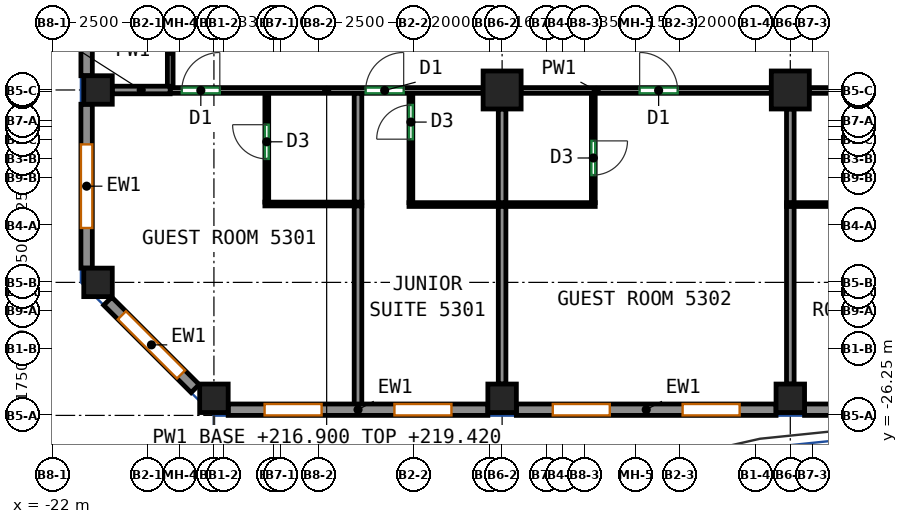
"""IFC4 building model, lengths in metres.
Left out: names, types, materials, properties, quantities, classifications, styles, units other than length and angle.
Written with IfcOpenShell. Run it as: python <this file> out.ifc"""

import sys

from ifc_helpers import new_model, si_unit, direction, frame, frame_2d, origin, origin_2d, place, context, subcontext, project, spatial, rectangle, extrude, source, transform, mapped, element, fill, save


model = new_model("IFC4")
c1 = context("Model", 3, precision=1e-05, world=origin(), true_north=direction((0.0, 1.0)))
c2 = subcontext(c1, "Body", "Model", "MODEL_VIEW")
j1 = project(units=[si_unit("LENGTHUNIT", "METRE"), si_unit("PLANEANGLEUNIT", "RADIAN")], contexts=[c1])
p1 = place(None, origin())
s1 = spatial("IfcSite", under=j1, at=p1, CompositionType="ELEMENT")
p2 = place(p1, origin())
s2 = spatial("IfcBuilding", under=s1, at=p2, CompositionType="ELEMENT")
p3 = place(p2, frame((0.0, 0.0, 216.9)))
s3 = spatial("IfcBuildingStorey", under=s2, at=p3, CompositionType="ELEMENT", Elevation=216.9)
m1 = source(origin(), c2, "Body", "SweptSolid", [
    extrude(rectangle(XDim=0.75, YDim=0.75, at=origin_2d()), origin(), (0.0, 0.0, 1.0), 3.12),
])
for number, where, z_axis, x_axis in (
    (1, (-20.8, -22.75, 0.0), (0.0, 0.0, 1.0), (1.0, 0.0, 0.0)),
    (2, (-20.8, -17.688, 0.0), (0.0, 0.0, 1.0), (1.0, 0.0, 0.0)),
    (3, (-17.75, -25.8, 0.0), (0.0, 0.0, 1.0), (1.0, 0.0, 0.0)),
    (4, (-10.167, -25.8, 0.0), (0.0, 0.0, 1.0), (1.0, 0.0, 0.0)),
):
    element("IfcColumn", number, at=place(p3, frame(where, z_axis=z_axis, x_axis=x_axis)), inside=s3, PredefinedType="COLUMN", context=c2, shape_type="MappedRepresentation", body=[
        mapped(m1, transform((0.0, 0.0, 0.0))),
    ])
m2 = source(origin(), c2, "Body", "SweptSolid", [
    extrude(rectangle(XDim=1.0, YDim=1.0, at=origin_2d()), origin(), (0.0, 0.0, 1.0), 3.12),
])
p4 = place(p3, frame((-10.167, -17.688, 0.0), z_axis=(0.0, 0.0, 1.0), x_axis=(1.0, 0.0, 0.0)))
e5 = element("IfcColumn", 5, at=p4, inside=s3, PredefinedType="COLUMN", context=c2, shape_type="MappedRepresentation", body=[
    mapped(m2, transform((0.0, 0.0, 0.0))),
])
p5 = place(p3, frame((-2.583, -25.8, 0.0), z_axis=(0.0, 0.0, 1.0), x_axis=(1.0, 0.0, 0.0)))
e6 = element("IfcColumn", 6, at=p5, inside=s3, PredefinedType="COLUMN", context=c2, shape_type="MappedRepresentation", body=[
    mapped(m1, transform((0.0, 0.0, 0.0))),
])
p6 = place(p3, frame((-2.583, -17.688, 0.0), z_axis=(0.0, 0.0, 1.0), x_axis=(1.0, 0.0, 0.0)))
e7 = element("IfcColumn", 7, at=p6, inside=s3, PredefinedType="COLUMN", context=c2, shape_type="MappedRepresentation", body=[
    mapped(m2, transform((0.0, 0.0, 0.0))),
])
m3 = source(origin(), c2, "Body", "SweptSolid", [
    extrude(rectangle(XDim=6.833, YDim=0.3, at=frame_2d((3.417, 0.0))), origin(), (0.0, 0.0, 1.0), 3.12),
])
p7 = place(p3, frame((-17.375, -26.1, 0.0), z_axis=(0.0, 0.0, 1.0), x_axis=(1.0, 0.0, 0.0)))
e8 = element("IfcWall", 8, at=p7, inside=s3, PredefinedType="SOLIDWALL", context=c2, shape_type="MappedRepresentation", body=[
    mapped(m3, transform((0.0, 0.0, 0.0))),
])
p8 = place(p7, frame((0.958, 0.0, 0.85)))
e9 = element("IfcOpeningElement", 9, at=p8, cuts=e8, PredefinedType="OPENING", context=c2, shape_type="SweptSolid", body=[
    extrude(rectangle(XDim=1.5, YDim=1.95, at=frame_2d((0.75, 0.975))), frame((0.0, 0.16, 0.0), z_axis=(0.0, -1.0, 0.0), x_axis=(1.0, 0.0, 0.0)), (0.0, 0.0, 1.0), 0.32),
])
p9 = place(p7, frame((4.375, 0.0, 0.85)))
e10 = element("IfcOpeningElement", 10, at=p9, cuts=e8, PredefinedType="OPENING", context=c2, shape_type="SweptSolid", body=[
    extrude(rectangle(XDim=1.5, YDim=1.95, at=frame_2d((0.75, 0.975))), frame((0.0, 0.16, 0.0), z_axis=(0.0, -1.0, 0.0), x_axis=(1.0, 0.0, 0.0)), (0.0, 0.0, 1.0), 0.32),
])
m4 = source(origin(), c2, "Body", "SweptSolid", [
    extrude(rectangle(XDim=6.833, YDim=0.3, at=frame_2d((3.417, 0.0))), origin(), (0.0, 0.0, 1.0), 3.12),
])
p10 = place(p3, frame((-9.792, -26.1, 0.0), z_axis=(0.0, 0.0, 1.0), x_axis=(1.0, 0.0, 0.0)))
e11 = element("IfcWall", 11, at=p10, inside=s3, PredefinedType="SOLIDWALL", context=c2, shape_type="MappedRepresentation", body=[
    mapped(m4, transform((0.0, 0.0, 0.0))),
])
p11 = place(p10, frame((0.958, 0.0, 0.85)))
e12 = element("IfcOpeningElement", 12, at=p11, cuts=e11, PredefinedType="OPENING", context=c2, shape_type="SweptSolid", body=[
    extrude(rectangle(XDim=1.5, YDim=1.95, at=frame_2d((0.75, 0.975))), frame((0.0, 0.16, 0.0), z_axis=(0.0, -1.0, 0.0), x_axis=(1.0, 0.0, 0.0)), (0.0, 0.0, 1.0), 0.32),
])
p12 = place(p10, frame((4.375, 0.0, 0.85)))
e13 = element("IfcOpeningElement", 13, at=p12, cuts=e11, PredefinedType="OPENING", context=c2, shape_type="SweptSolid", body=[
    extrude(rectangle(XDim=1.5, YDim=1.95, at=frame_2d((0.75, 0.975))), frame((0.0, 0.16, 0.0), z_axis=(0.0, -1.0, 0.0), x_axis=(1.0, 0.0, 0.0)), (0.0, 0.0, 1.0), 0.32),
])
p13 = place(p3, frame((-2.208, -26.1, 0.0), z_axis=(0.0, 0.0, 1.0), x_axis=(1.0, 0.0, 0.0)))
e14 = element("IfcWall", 14, at=p13, inside=s3, PredefinedType="SOLIDWALL", context=c2, shape_type="MappedRepresentation", body=[
    mapped(m3, transform((0.0, 0.0, 0.0))),
])
p14 = place(p13, frame((0.958, 0.0, 0.85)))
e15 = element("IfcOpeningElement", 15, at=p14, cuts=e14, PredefinedType="OPENING", context=c2, shape_type="SweptSolid", body=[
    extrude(rectangle(XDim=1.5, YDim=1.95, at=frame_2d((0.75, 0.975))), frame((0.0, 0.16, 0.0), z_axis=(0.0, -1.0, 0.0), x_axis=(1.0, 0.0, 0.0)), (0.0, 0.0, 1.0), 0.32),
])
p15 = place(p13, frame((4.375, 0.0, 0.85)))
e16 = element("IfcOpeningElement", 16, at=p15, cuts=e14, PredefinedType="OPENING", context=c2, shape_type="SweptSolid", body=[
    extrude(rectangle(XDim=1.5, YDim=1.95, at=frame_2d((0.75, 0.975))), frame((0.0, 0.16, 0.0), z_axis=(0.0, -1.0, 0.0), x_axis=(1.0, 0.0, 0.0)), (0.0, 0.0, 1.0), 0.32),
])
m5 = source(origin(), c2, "Body", "SweptSolid", [
    extrude(rectangle(XDim=7.812, YDim=0.3, at=frame_2d((3.906, 0.0))), origin(), (0.0, 0.0, 1.0), 3.12),
])
p16 = place(p3, frame((-21.1, -9.5, 0.0), z_axis=(0.0, 0.0, 1.0), x_axis=(0.0, -1.0, 0.0)))
e17 = element("IfcWall", 17, at=p16, inside=s3, PredefinedType="SOLIDWALL", context=c2, shape_type="MappedRepresentation", body=[
    mapped(m5, transform((0.0, 0.0, 0.0))),
])
p17 = place(p16, frame((0.853, 0.0, 0.85)))
e18 = element("IfcOpeningElement", 18, at=p17, cuts=e17, PredefinedType="OPENING", context=c2, shape_type="SweptSolid", body=[
    extrude(rectangle(XDim=2.2, YDim=1.95, at=frame_2d((1.1, 0.975))), frame((0.0, 0.16, 0.0), z_axis=(0.0, -1.0, 0.0), x_axis=(1.0, 0.0, 0.0)), (0.0, 0.0, 1.0), 0.32),
])
p18 = place(p16, frame((4.759, 0.0, 0.85)))
e19 = element("IfcOpeningElement", 19, at=p18, cuts=e17, PredefinedType="OPENING", context=c2, shape_type="SweptSolid", body=[
    extrude(rectangle(XDim=2.2, YDim=1.95, at=frame_2d((1.1, 0.975))), frame((0.0, 0.16, 0.0), z_axis=(0.0, -1.0, 0.0), x_axis=(1.0, 0.0, 0.0)), (0.0, 0.0, 1.0), 0.32),
])
m6 = source(origin(), c2, "Body", "SweptSolid", [
    extrude(rectangle(XDim=4.312, YDim=0.3, at=frame_2d((2.156, 0.0))), origin(), (0.0, 0.0, 1.0), 3.12),
])
p19 = place(p3, frame((-21.1, -18.062, 0.0), z_axis=(0.0, 0.0, 1.0), x_axis=(0.0, -1.0, 0.0)))
e20 = element("IfcWall", 20, at=p19, inside=s3, PredefinedType="SOLIDWALL", context=c2, shape_type="MappedRepresentation", body=[
    mapped(m6, transform((0.0, 0.0, 0.0))),
])
p20 = place(p19, frame((1.056, 0.0, 0.85)))
e21 = element("IfcOpeningElement", 21, at=p20, cuts=e20, PredefinedType="OPENING", context=c2, shape_type="SweptSolid", body=[
    extrude(rectangle(XDim=2.2, YDim=1.95, at=frame_2d((1.1, 0.975))), frame((0.0, 0.16, 0.0), z_axis=(0.0, -1.0, 0.0), x_axis=(1.0, 0.0, 0.0)), (0.0, 0.0, 1.0), 0.32),
])
m7 = source(origin(), c2, "Body", "SweptSolid", [
    extrude(rectangle(XDim=3.253, YDim=0.3, at=frame_2d((1.626, 0.0))), origin(), (0.0, 0.0, 1.0), 3.12),
])
p21 = place(p3, frame((-20.544, -23.244, 0.0), z_axis=(0.0, 0.0, 1.0), x_axis=(0.707106781187, -0.707106781187, 0.0)))
e22 = element("IfcWall", 22, at=p21, inside=s3, PredefinedType="SOLIDWALL", context=c2, shape_type="MappedRepresentation", body=[
    mapped(m7, transform((0.0, 0.0, 0.0))),
])
p22 = place(p21, frame((0.526, 0.0, 0.85)))
e23 = element("IfcOpeningElement", 23, at=p22, cuts=e22, PredefinedType="OPENING", context=c2, shape_type="SweptSolid", body=[
    extrude(rectangle(XDim=2.2, YDim=1.95, at=frame_2d((1.1, 0.975))), frame((0.0, 0.16, 0.0), z_axis=(0.0, -1.0, 0.0), x_axis=(1.0, 0.0, 0.0)), (0.0, 0.0, 1.0), 0.32),
])
p23 = place(p3, frame((-18.9, -17.7, 0.0), z_axis=(0.0, 0.0, 1.0), x_axis=(1.0, 0.0, 0.0)))
e24 = element("IfcWall", 24, at=p23, inside=s3, PredefinedType="PARTITIONING", context=c2, shape_type="SweptSolid", body=[
    extrude(rectangle(XDim=8.233, YDim=0.15, at=frame_2d((4.116, 0.0))), origin(), (0.0, 0.0, 1.0), 2.52),
])
p24 = place(p23, frame((0.305, 0.0, 0.0)))
e25 = element("IfcOpeningElement", 25, at=p24, cuts=e24, PredefinedType="OPENING", context=c2, shape_type="SweptSolid", body=[
    extrude(rectangle(XDim=1.0, YDim=2.1, at=frame_2d((0.5, 1.05))), frame((0.0, 0.085, 0.0), z_axis=(0.0, -1.0, 0.0), x_axis=(1.0, 0.0, 0.0)), (0.0, 0.0, 1.0), 0.17),
])
p25 = place(p23, frame((5.143, 0.0, 0.0)))
e26 = element("IfcOpeningElement", 26, at=p25, cuts=e24, PredefinedType="OPENING", context=c2, shape_type="SweptSolid", body=[
    extrude(rectangle(XDim=1.0, YDim=2.1, at=frame_2d((0.5, 1.05))), frame((0.0, 0.085, 0.0), z_axis=(0.0, -1.0, 0.0), x_axis=(1.0, 0.0, 0.0)), (0.0, 0.0, 1.0), 0.17),
])
p26 = place(p3, frame((-9.667, -17.7, 0.0), z_axis=(0.0, 0.0, 1.0), x_axis=(1.0, 0.0, 0.0)))
e27 = element("IfcWall", 27, at=p26, inside=s3, PredefinedType="PARTITIONING", context=c2, shape_type="SweptSolid", body=[
    extrude(rectangle(XDim=6.584, YDim=0.15, at=frame_2d((3.292, 0.0))), origin(), (0.0, 0.0, 1.0), 3.12),
])
p27 = place(p26, frame((3.119, 0.0, 0.0)))
e28 = element("IfcOpeningElement", 28, at=p27, cuts=e27, PredefinedType="OPENING", context=c2, shape_type="SweptSolid", body=[
    extrude(rectangle(XDim=1.0, YDim=2.1, at=frame_2d((0.5, 1.05))), frame((0.0, 0.085, 0.0), z_axis=(0.0, -1.0, 0.0), x_axis=(1.0, 0.0, 0.0)), (0.0, 0.0, 1.0), 0.17),
])
p28 = place(p3, frame((-2.083, -17.7, 0.0), z_axis=(0.0, 0.0, 1.0), x_axis=(1.0, 0.0, 0.0)))
e29 = element("IfcWall", 29, at=p28, inside=s3, PredefinedType="PARTITIONING", context=c2, shape_type="SweptSolid", body=[
    extrude(rectangle(XDim=6.583, YDim=0.15, at=frame_2d((3.292, 0.0))), origin(), (0.0, 0.0, 1.0), 3.12),
])
p29 = place(p28, frame((2.171, 0.0, 0.0)))
e30 = element("IfcOpeningElement", 30, at=p29, cuts=e29, PredefinedType="OPENING", context=c2, shape_type="SweptSolid", body=[
    extrude(rectangle(XDim=1.0, YDim=2.1, at=frame_2d((0.5, 1.05))), frame((0.0, 0.085, 0.0), z_axis=(0.0, -1.0, 0.0), x_axis=(1.0, 0.0, 0.0)), (0.0, 0.0, 1.0), 0.17),
])
p30 = place(p28, frame((3.543, 0.0, 0.0)))
e31 = element("IfcOpeningElement", 31, at=p30, cuts=e29, PredefinedType="OPENING", context=c2, shape_type="SweptSolid", body=[
    extrude(rectangle(XDim=1.0, YDim=2.1, at=frame_2d((0.5, 1.05))), frame((0.0, 0.085, 0.0), z_axis=(0.0, -1.0, 0.0), x_axis=(1.0, 0.0, 0.0)), (0.0, 0.0, 1.0), 0.17),
])
p31 = place(p3, frame((-18.9, -17.598, 0.0), z_axis=(0.0, 0.0, 1.0), x_axis=(0.0, 1.0, 0.0)))
e32 = element("IfcWall", 32, at=p31, inside=s3, PredefinedType="PARTITIONING", context=c2, shape_type="SweptSolid", body=[
    extrude(rectangle(XDim=1.855, YDim=0.15, at=frame_2d((0.927, 0.0))), origin(), (0.0, 0.0, 1.0), 3.12),
])
p32 = place(p3, frame((-16.359, -20.638, 0.0), z_axis=(0.0, 0.0, 1.0), x_axis=(0.0, 1.0, 0.0)))
e33 = element("IfcWall", 33, at=p32, inside=s3, PredefinedType="PARTITIONING", context=c2, shape_type="SweptSolid", body=[
    extrude(rectangle(XDim=2.861, YDim=0.1, at=frame_2d((1.43, 0.0))), origin(), (0.0, 0.0, 1.0), 3.12),
])
p33 = place(p32, frame((1.137, 0.0, 0.0)))
e34 = element("IfcOpeningElement", 34, at=p33, cuts=e33, PredefinedType="OPENING", context=c2, shape_type="SweptSolid", body=[
    extrude(rectangle(XDim=0.9, YDim=2.1, at=frame_2d((0.45, 1.05))), frame((0.0, 0.06, 0.0), z_axis=(0.0, -1.0, 0.0), x_axis=(1.0, 0.0, 0.0)), (0.0, 0.0, 1.0), 0.12),
])
p34 = place(p3, frame((-16.409, -20.688, 0.0), z_axis=(0.0, 0.0, 1.0), x_axis=(1.0, 0.0, 0.0)))
e35 = element("IfcWall", 35, at=p34, inside=s3, PredefinedType="PARTITIONING", context=c2, shape_type="SweptSolid", body=[
    extrude(rectangle(XDim=2.55, YDim=0.1, at=frame_2d((1.275, 0.0))), origin(), (0.0, 0.0, 1.0), 3.12),
])
p35 = place(p3, frame((-13.959, -26.0, 0.0), z_axis=(0.0, 0.0, 1.0), x_axis=(0.0, 1.0, 0.0)))
e36 = element("IfcWall", 36, at=p35, inside=s3, PredefinedType="PARTITIONING", context=c2, shape_type="SweptSolid", body=[
    extrude(rectangle(XDim=5.262, YDim=0.2, at=frame_2d((2.631, 0.0))), origin(), (0.0, 0.0, 1.0), 3.12),
])
p36 = place(p3, frame((-20.425, -17.688, 0.0), z_axis=(0.0, 0.0, 1.0), x_axis=(1.0, 0.0, 0.0)))
e37 = element("IfcWall", 37, at=p36, inside=s3, PredefinedType="PARTITIONING", context=c2, shape_type="SweptSolid", body=[
    extrude(rectangle(XDim=1.523, YDim=0.2, at=frame_2d((0.761, 0.0))), origin(), (0.0, 0.0, 1.0), 2.52),
])
p37 = place(p3, frame((-13.959, -20.638, 0.0), z_axis=(0.0, 0.0, 1.0), x_axis=(0.0, 1.0, 0.0)))
e38 = element("IfcWall", 38, at=p37, inside=s3, PredefinedType="PARTITIONING", context=c2, shape_type="SweptSolid", body=[
    extrude(rectangle(XDim=2.861, YDim=0.2, at=frame_2d((1.43, 0.0))), origin(), (0.0, 0.0, 1.0), 3.12),
])
p38 = place(p3, frame((-12.567, -20.652, 0.0), z_axis=(0.0, 0.0, 1.0), x_axis=(0.0, 1.0, 0.0)))
e39 = element("IfcWall", 39, at=p38, inside=s3, PredefinedType="PARTITIONING", context=c2, shape_type="SweptSolid", body=[
    extrude(rectangle(XDim=2.875, YDim=0.1, at=frame_2d((1.438, 0.0))), origin(), (0.0, 0.0, 1.0), 3.12),
])
p39 = place(p38, frame((1.67, 0.0, 0.0)))
e40 = element("IfcOpeningElement", 40, at=p39, cuts=e39, PredefinedType="OPENING", context=c2, shape_type="SweptSolid", body=[
    extrude(rectangle(XDim=0.9, YDim=2.1, at=frame_2d((0.45, 1.05))), frame((0.0, 0.06, 0.0), z_axis=(0.0, -1.0, 0.0), x_axis=(1.0, 0.0, 0.0)), (0.0, 0.0, 1.0), 0.12),
])
p40 = place(p3, frame((-12.617, -20.702, 0.0), z_axis=(0.0, 0.0, 1.0), x_axis=(1.0, 0.0, 0.0)))
e41 = element("IfcWall", 41, at=p40, inside=s3, PredefinedType="PARTITIONING", context=c2, shape_type="SweptSolid", body=[
    extrude(rectangle(XDim=4.9, YDim=0.1, at=frame_2d((2.45, 0.0))), origin(), (0.0, 0.0, 1.0), 3.12),
])
p41 = place(p3, frame((-10.167, -25.425, 0.0), z_axis=(0.0, 0.0, 1.0), x_axis=(0.0, 1.0, 0.0)))
e42 = element("IfcWall", 42, at=p41, inside=s3, PredefinedType="PARTITIONING", context=c2, shape_type="SweptSolid", body=[
    extrude(rectangle(XDim=4.673, YDim=0.2, at=frame_2d((2.336, 0.0))), origin(), (0.0, 0.0, 1.0), 3.12),
])
p42 = place(p3, frame((-10.167, -20.652, 0.0), z_axis=(0.0, 0.0, 1.0), x_axis=(0.0, 1.0, 0.0)))
e43 = element("IfcWall", 43, at=p42, inside=s3, PredefinedType="PARTITIONING", context=c2, shape_type="SweptSolid", body=[
    extrude(rectangle(XDim=2.464, YDim=0.2, at=frame_2d((1.232, 0.0))), origin(), (0.0, 0.0, 1.0), 3.12),
])
p43 = place(p3, frame((-7.767, -17.777, 0.0), z_axis=(0.0, 0.0, 1.0), x_axis=(0.0, -1.0, 0.0)))
e44 = element("IfcWall", 44, at=p43, inside=s3, PredefinedType="PARTITIONING", context=c2, shape_type="SweptSolid", body=[
    extrude(rectangle(XDim=2.875, YDim=0.1, at=frame_2d((1.438, 0.0))), origin(), (0.0, 0.0, 1.0), 3.12),
])
p44 = place(p43, frame((1.25, 0.0, 0.0)))
e45 = element("IfcOpeningElement", 45, at=p44, cuts=e44, PredefinedType="OPENING", context=c2, shape_type="SweptSolid", body=[
    extrude(rectangle(XDim=0.9, YDim=2.1, at=frame_2d((0.45, 1.05))), frame((0.0, 0.06, 0.0), z_axis=(0.0, -1.0, 0.0), x_axis=(1.0, 0.0, 0.0)), (0.0, 0.0, 1.0), 0.12),
])
p45 = place(p3, frame((-2.583, -25.425, 0.0), z_axis=(0.0, 0.0, 1.0), x_axis=(0.0, 1.0, 0.0)))
e46 = element("IfcWall", 46, at=p45, inside=s3, PredefinedType="PARTITIONING", context=c2, shape_type="SweptSolid", body=[
    extrude(rectangle(XDim=4.683, YDim=0.2, at=frame_2d((2.342, 0.0))), origin(), (0.0, 0.0, 1.0), 3.12),
])
p46 = place(p3, frame((-2.583, -20.662, 0.0), z_axis=(0.0, 0.0, 1.0), x_axis=(0.0, 1.0, 0.0)))
e47 = element("IfcWall", 47, at=p46, inside=s3, PredefinedType="PARTITIONING", context=c2, shape_type="SweptSolid", body=[
    extrude(rectangle(XDim=2.474, YDim=0.2, at=frame_2d((1.237, 0.0))), origin(), (0.0, 0.0, 1.0), 3.12),
])
p47 = place(p3, frame((-2.683, -20.702, 0.0), z_axis=(0.0, 0.0, 1.0), x_axis=(1.0, 0.0, 0.0)))
e48 = element("IfcWall", 48, at=p47, inside=s3, PredefinedType="PARTITIONING", context=c2, shape_type="SweptSolid", body=[
    extrude(rectangle(XDim=2.55, YDim=0.1, at=frame_2d((1.275, 0.0))), origin(), (0.0, 0.0, 1.0), 3.12),
])
p48 = place(p8, origin())
e49 = element("IfcWindow", 49, at=p48, inside=s3, PartitioningType="SINGLE_PANEL", PredefinedType="WINDOW", context=c2, shape_type="SweptSolid", body=[
    extrude(rectangle(XDim=1.5, YDim=1.95, at=frame_2d((0.75, 0.975))), frame((0.0, 0.03, 0.0), z_axis=(0.0, -1.0, 0.0), x_axis=(1.0, 0.0, 0.0)), (0.0, 0.0, 1.0), 0.06),
])
fill(e9, e49)
p49 = place(p9, origin())
e50 = element("IfcWindow", 50, at=p49, inside=s3, PartitioningType="SINGLE_PANEL", PredefinedType="WINDOW", context=c2, shape_type="SweptSolid", body=[
    extrude(rectangle(XDim=1.5, YDim=1.95, at=frame_2d((0.75, 0.975))), frame((0.0, 0.03, 0.0), z_axis=(0.0, -1.0, 0.0), x_axis=(1.0, 0.0, 0.0)), (0.0, 0.0, 1.0), 0.06),
])
fill(e10, e50)
p50 = place(p11, origin())
e51 = element("IfcWindow", 51, at=p50, inside=s3, PartitioningType="SINGLE_PANEL", PredefinedType="WINDOW", context=c2, shape_type="SweptSolid", body=[
    extrude(rectangle(XDim=1.5, YDim=1.95, at=frame_2d((0.75, 0.975))), frame((0.0, 0.03, 0.0), z_axis=(0.0, -1.0, 0.0), x_axis=(1.0, 0.0, 0.0)), (0.0, 0.0, 1.0), 0.06),
])
fill(e12, e51)
p51 = place(p12, origin())
e52 = element("IfcWindow", 52, at=p51, inside=s3, PartitioningType="SINGLE_PANEL", PredefinedType="WINDOW", context=c2, shape_type="SweptSolid", body=[
    extrude(rectangle(XDim=1.5, YDim=1.95, at=frame_2d((0.75, 0.975))), frame((0.0, 0.03, 0.0), z_axis=(0.0, -1.0, 0.0), x_axis=(1.0, 0.0, 0.0)), (0.0, 0.0, 1.0), 0.06),
])
fill(e13, e52)
p52 = place(p20, origin())
e53 = element("IfcWindow", 53, at=p52, inside=s3, PartitioningType="SINGLE_PANEL", PredefinedType="WINDOW", context=c2, shape_type="SweptSolid", body=[
    extrude(rectangle(XDim=2.2, YDim=1.95, at=frame_2d((1.1, 0.975))), frame((0.0, 0.03, 0.0), z_axis=(0.0, -1.0, 0.0), x_axis=(1.0, 0.0, 0.0)), (0.0, 0.0, 1.0), 0.06),
])
fill(e21, e53)
p53 = place(p22, origin())
e54 = element("IfcWindow", 54, at=p53, inside=s3, PartitioningType="SINGLE_PANEL", PredefinedType="WINDOW", context=c2, shape_type="SweptSolid", body=[
    extrude(rectangle(XDim=2.2, YDim=1.95, at=frame_2d((1.1, 0.975))), frame((0.0, 0.03, 0.0), z_axis=(0.0, -1.0, 0.0), x_axis=(1.0, 0.0, 0.0)), (0.0, 0.0, 1.0), 0.06),
])
fill(e23, e54)
p54 = place(p44, origin())
e55 = element("IfcDoor", 55, at=p54, inside=s3, OperationType="SINGLE_SWING_LEFT", PredefinedType="DOOR", context=c2, shape_type="SweptSolid", body=[
    extrude(rectangle(XDim=0.9, YDim=2.1, at=frame_2d((0.45, 1.05))), frame((0.0, 0.025, 0.0), z_axis=(0.0, -1.0, 0.0), x_axis=(1.0, 0.0, 0.0)), (0.0, 0.0, 1.0), 0.05),
])
fill(e45, e55)
p55 = place(p33, origin())
e56 = element("IfcDoor", 56, at=p55, inside=s3, OperationType="SINGLE_SWING_RIGHT", PredefinedType="DOOR", context=c2, shape_type="SweptSolid", body=[
    extrude(rectangle(XDim=0.9, YDim=2.1, at=frame_2d((0.45, 1.05))), frame((0.0, 0.025, 0.0), z_axis=(0.0, -1.0, 0.0), x_axis=(1.0, 0.0, 0.0)), (0.0, 0.0, 1.0), 0.05),
])
fill(e34, e56)
p56 = place(p39, origin())
e57 = element("IfcDoor", 57, at=p56, inside=s3, OperationType="SINGLE_SWING_LEFT", PredefinedType="DOOR", context=c2, shape_type="SweptSolid", body=[
    extrude(rectangle(XDim=0.9, YDim=2.1, at=frame_2d((0.45, 1.05))), frame((0.0, 0.025, 0.0), z_axis=(0.0, -1.0, 0.0), x_axis=(1.0, 0.0, 0.0)), (0.0, 0.0, 1.0), 0.05),
])
fill(e40, e57)
p57 = place(p24, origin())
e58 = element("IfcDoor", 58, at=p57, inside=s3, OperationType="SINGLE_SWING_RIGHT", PredefinedType="DOOR", context=c2, shape_type="SweptSolid", body=[
    extrude(rectangle(XDim=1.0, YDim=2.1, at=frame_2d((0.5, 1.05))), frame((0.0, 0.025, 0.0), z_axis=(0.0, -1.0, 0.0), x_axis=(1.0, 0.0, 0.0)), (0.0, 0.0, 1.0), 0.05),
])
fill(e25, e58)
p58 = place(p25, origin())
e59 = element("IfcDoor", 59, at=p58, inside=s3, OperationType="SINGLE_SWING_RIGHT", PredefinedType="DOOR", context=c2, shape_type="SweptSolid", body=[
    extrude(rectangle(XDim=1.0, YDim=2.1, at=frame_2d((0.5, 1.05))), frame((0.0, 0.025, 0.0), z_axis=(0.0, -1.0, 0.0), x_axis=(1.0, 0.0, 0.0)), (0.0, 0.0, 1.0), 0.05),
])
fill(e26, e59)
p59 = place(p27, origin())
e60 = element("IfcDoor", 60, at=p59, inside=s3, OperationType="SINGLE_SWING_LEFT", PredefinedType="DOOR", context=c2, shape_type="SweptSolid", body=[
    extrude(rectangle(XDim=1.0, YDim=2.1, at=frame_2d((0.5, 1.05))), frame((0.0, 0.025, 0.0), z_axis=(0.0, -1.0, 0.0), x_axis=(1.0, 0.0, 0.0)), (0.0, 0.0, 1.0), 0.05),
])
fill(e28, e60)
save(model, sys.argv[1])
